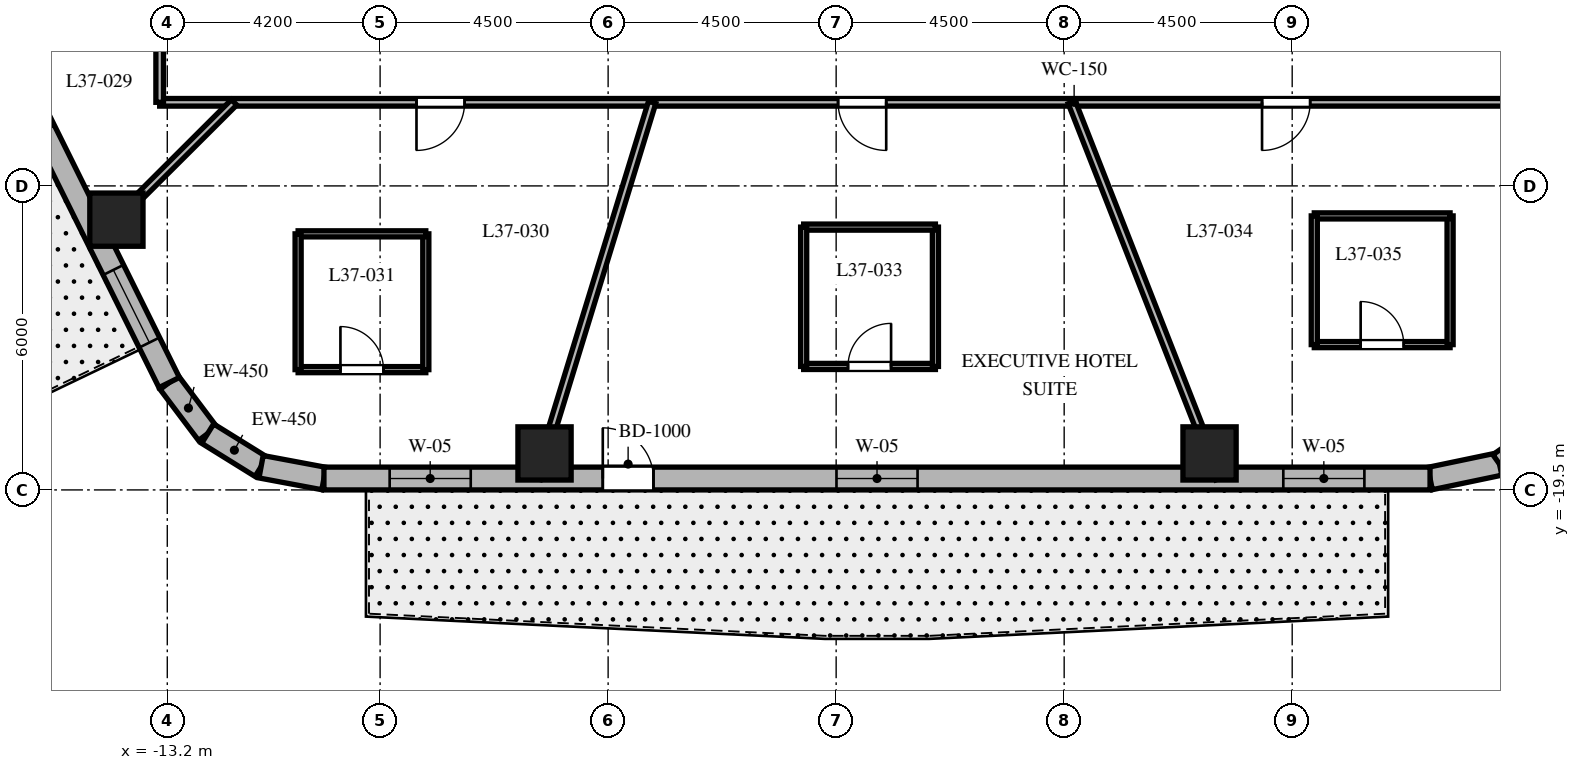
"""IFC4 building model, lengths in metres.
Left out: names, types, materials, properties, quantities, classifications, styles, units other than length and angle.
Written with IfcOpenShell. Run it as: python <this file> out.ifc"""

import sys

from ifc_helpers import new_model, si_unit, direction, frame, frame_2d, origin, origin_2d, place, context, subcontext, project, spatial, rectangle, extrude, element, fill, save


model = new_model("IFC4")
c1 = context("Model", 3, precision=1e-05, world=origin(), true_north=direction((0.0, 1.0)))
c2 = subcontext(c1, "Body", "Model", "MODEL_VIEW")
j1 = project(units=[si_unit("LENGTHUNIT", "METRE"), si_unit("PLANEANGLEUNIT", "RADIAN")], contexts=[c1])
p1 = place(None, origin())
s1 = spatial("IfcSite", under=j1, at=p1, CompositionType="ELEMENT")
p2 = place(p1, origin())
s2 = spatial("IfcBuilding", under=s1, at=p2, CompositionType="ELEMENT")
p3 = place(p2, frame((0.0, 0.0, 151.7)))
s3 = spatial("IfcBuildingStorey", under=s2, at=p3, CompositionType="ELEMENT", Elevation=151.7)
for number, where, z_axis, x_axis in (
    (1, (-5.755, -18.78, 0.0), (0.0, 0.0, 1.0), (1.0, 0.0, 0.0)),
    (2, (7.369, -18.78, 0.0), (0.0, 0.0, 1.0), (1.0, 0.0, 0.0)),
    (3, (-14.204, -14.166, 0.0), (0.0, 0.0, 1.0), (1.0, 0.0, 0.0)),
):
    element("IfcColumn", number, at=place(p3, frame(where, z_axis=z_axis, x_axis=x_axis)), inside=s3, PredefinedType="COLUMN", context=c2, shape_type="SweptSolid", body=[
        extrude(rectangle(XDim=1.05, YDim=1.05, at=origin_2d()), origin(), (0.0, 0.0, 1.0), 3.7),
    ])
p4 = place(p3, frame((-13.162, -17.381, 0.0), z_axis=(0.0, 0.0, 1.0), x_axis=(0.601515770517, -0.798860925205, 0.0)))
e4 = element("IfcWall", 4, at=p4, inside=s3, PredefinedType="SOLIDWALL", context=c2, shape_type="SweptSolid", body=[
    extrude(rectangle(XDim=1.262, YDim=0.45, at=frame_2d((0.631, 0.0))), origin(), (0.0, 0.0, 1.0), 3.4),
])
p5 = place(p3, frame((-12.403, -18.389, 0.0), z_axis=(0.0, 0.0, 1.0), x_axis=(0.849795170926, -0.527113049991, 0.0)))
e5 = element("IfcWall", 5, at=p5, inside=s3, PredefinedType="SOLIDWALL", context=c2, shape_type="SweptSolid", body=[
    extrude(rectangle(XDim=1.241, YDim=0.45, at=frame_2d((0.62, 0.0))), origin(), (0.0, 0.0, 1.0), 3.4),
])
p6 = place(p3, frame((-11.349, -19.043, 0.0), z_axis=(0.0, 0.0, 1.0), x_axis=(0.982931267051, -0.183973161772, 0.0)))
e6 = element("IfcWall", 6, at=p6, inside=s3, PredefinedType="SOLIDWALL", context=c2, shape_type="SweptSolid", body=[
    extrude(rectangle(XDim=1.262, YDim=0.45, at=frame_2d((0.631, 0.0))), origin(), (0.0, 0.0, 1.0), 3.4),
])
p7 = place(p3, frame((11.72, -19.275, 0.0), z_axis=(0.0, 0.0, 1.0), x_axis=(0.97893106758, 0.204191001093, 0.0)))
e7 = element("IfcWall", 7, at=p7, inside=s3, PredefinedType="SOLIDWALL", context=c2, shape_type="SweptSolid", body=[
    extrude(rectangle(XDim=1.4, YDim=0.45, at=frame_2d((0.7, 0.0))), origin(), (0.0, 0.0, 1.0), 3.4),
])
p8 = place(p3, frame((13.091, -18.989, 0.0), z_axis=(0.0, 0.0, 1.0), x_axis=(0.815574637848, 0.578651890258, 0.0)))
e8 = element("IfcWall", 8, at=p8, inside=s3, PredefinedType="SOLIDWALL", context=c2, shape_type="SweptSolid", body=[
    extrude(rectangle(XDim=1.377, YDim=0.45, at=frame_2d((0.688, 0.0))), origin(), (0.0, 0.0, 1.0), 3.4),
])
p9 = place(p3, frame((-10.108, -19.275, 0.0), z_axis=(0.0, 0.0, 1.0), x_axis=(1.0, 0.0, 0.0)))
e9 = element("IfcWall", 9, at=p9, inside=s3, PredefinedType="SOLIDWALL", context=c2, shape_type="SweptSolid", body=[
    extrude(rectangle(XDim=21.829, YDim=0.45, at=frame_2d((10.915, 0.0))), origin(), (0.0, 0.0, 1.0), 3.4),
])
p10 = place(p9, frame((5.503, 0.0, 0.0)))
e10 = element("IfcOpeningElement", 10, at=p10, cuts=e9, PredefinedType="OPENING", context=c2, shape_type="SweptSolid", body=[
    extrude(rectangle(XDim=1.0, YDim=2.15, at=frame_2d((0.5, 1.075))), frame((0.0, 0.235, 0.0), z_axis=(0.0, -1.0, 0.0), x_axis=(1.0, 0.0, 0.0)), (0.0, 0.0, 1.0), 0.47),
])
p11 = place(p9, frame((1.297, 0.0, 0.8)))
e11 = element("IfcOpeningElement", 11, at=p11, cuts=e9, PredefinedType="OPENING", context=c2, shape_type="SweptSolid", body=[
    extrude(rectangle(XDim=1.6, YDim=1.75, at=frame_2d((0.8, 0.875))), frame((0.0, 0.235, 0.0), z_axis=(0.0, -1.0, 0.0), x_axis=(1.0, 0.0, 0.0)), (0.0, 0.0, 1.0), 0.47),
])
p12 = place(p9, frame((10.115, 0.0, 0.8)))
e12 = element("IfcOpeningElement", 12, at=p12, cuts=e9, PredefinedType="OPENING", context=c2, shape_type="SweptSolid", body=[
    extrude(rectangle(XDim=1.6, YDim=1.75, at=frame_2d((0.8, 0.875))), frame((0.0, 0.235, 0.0), z_axis=(0.0, -1.0, 0.0), x_axis=(1.0, 0.0, 0.0)), (0.0, 0.0, 1.0), 0.47),
])
p13 = place(p9, frame((18.933, 0.0, 0.8)))
e13 = element("IfcOpeningElement", 13, at=p13, cuts=e9, PredefinedType="OPENING", context=c2, shape_type="SweptSolid", body=[
    extrude(rectangle(XDim=1.6, YDim=1.75, at=frame_2d((0.8, 0.875))), frame((0.0, 0.235, 0.0), z_axis=(0.0, -1.0, 0.0), x_axis=(1.0, 0.0, 0.0)), (0.0, 0.0, 1.0), 0.47),
])
p14 = place(p3, frame((-20.618, -2.344, 0.0), z_axis=(0.0, 0.0, 1.0), x_axis=(0.444243691097, -0.895905990002, 0.0)))
e14 = element("IfcWall", 14, at=p14, inside=s3, PredefinedType="SOLIDWALL", context=c2, shape_type="SweptSolid", body=[
    extrude(rectangle(XDim=16.784, YDim=0.45, at=frame_2d((8.392, 0.0))), origin(), (0.0, 0.0, 1.0), 3.4),
])
p15 = place(p14, frame((4.535, 0.0, 0.0)))
e15 = element("IfcOpeningElement", 15, at=p15, cuts=e14, PredefinedType="OPENING", context=c2, shape_type="SweptSolid", body=[
    extrude(rectangle(XDim=0.95, YDim=2.15, at=frame_2d((0.475, 1.075))), frame((0.0, 0.235, 0.0), z_axis=(0.0, -1.0, 0.0), x_axis=(1.0, 0.0, 0.0)), (0.0, 0.0, 1.0), 0.47),
])
p16 = place(p14, frame((0.931, 0.0, 0.8)))
e16 = element("IfcOpeningElement", 16, at=p16, cuts=e14, PredefinedType="OPENING", context=c2, shape_type="SweptSolid", body=[
    extrude(rectangle(XDim=1.6, YDim=1.75, at=frame_2d((0.8, 0.875))), frame((0.0, 0.235, 0.0), z_axis=(0.0, -1.0, 0.0), x_axis=(1.0, 0.0, 0.0)), (0.0, 0.0, 1.0), 0.47),
])
p17 = place(p14, frame((5.942, 0.0, 0.8)))
e17 = element("IfcOpeningElement", 17, at=p17, cuts=e14, PredefinedType="OPENING", context=c2, shape_type="SweptSolid", body=[
    extrude(rectangle(XDim=1.0, YDim=1.65, at=frame_2d((0.5, 0.825))), frame((0.0, 0.235, 0.0), z_axis=(0.0, -1.0, 0.0), x_axis=(1.0, 0.0, 0.0)), (0.0, 0.0, 1.0), 0.47),
])
p18 = place(p14, frame((9.633, 0.0, 0.8)))
e18 = element("IfcOpeningElement", 18, at=p18, cuts=e14, PredefinedType="OPENING", context=c2, shape_type="SweptSolid", body=[
    extrude(rectangle(XDim=1.6, YDim=1.75, at=frame_2d((0.8, 0.875))), frame((0.0, 0.235, 0.0), z_axis=(0.0, -1.0, 0.0), x_axis=(1.0, 0.0, 0.0)), (0.0, 0.0, 1.0), 0.47),
])
p19 = place(p14, frame((14.303, 0.0, 0.8)))
e19 = element("IfcOpeningElement", 19, at=p19, cuts=e14, PredefinedType="OPENING", context=c2, shape_type="SweptSolid", body=[
    extrude(rectangle(XDim=1.6, YDim=1.75, at=frame_2d((0.8, 0.875))), frame((0.0, 0.235, 0.0), z_axis=(0.0, -1.0, 0.0), x_axis=(1.0, 0.0, 0.0)), (0.0, 0.0, 1.0), 0.47),
])
p20 = place(p3, frame((13.35, -11.85, 0.0), z_axis=(0.0, 0.0, 1.0), x_axis=(-1.0, 0.0, 0.0)))
e20 = element("IfcWall", 20, at=p20, inside=s3, PredefinedType="PARTITIONING", context=c2, shape_type="SweptSolid", body=[
    extrude(rectangle(XDim=26.7, YDim=0.15, at=frame_2d((13.35, 0.0))), origin(), (0.0, 0.0, 1.0), 2.84),
])
p21 = place(p20, frame((20.682, 0.0, 0.0)))
e21 = element("IfcOpeningElement", 21, at=p21, cuts=e20, PredefinedType="OPENING", context=c2, shape_type="SweptSolid", body=[
    extrude(rectangle(XDim=0.95, YDim=2.03, at=frame_2d((0.475, 1.015))), frame((0.0, 0.085, 0.0), z_axis=(0.0, -1.0, 0.0), x_axis=(1.0, 0.0, 0.0)), (0.0, 0.0, 1.0), 0.17),
])
p22 = place(p20, frame((12.362, 0.0, 0.0)))
e22 = element("IfcOpeningElement", 22, at=p22, cuts=e20, PredefinedType="OPENING", context=c2, shape_type="SweptSolid", body=[
    extrude(rectangle(XDim=0.95, YDim=2.03, at=frame_2d((0.475, 1.015))), frame((0.0, 0.085, 0.0), z_axis=(0.0, -1.0, 0.0), x_axis=(1.0, 0.0, 0.0)), (0.0, 0.0, 1.0), 0.17),
])
p23 = place(p20, frame((3.995, 0.0, 0.0)))
e23 = element("IfcOpeningElement", 23, at=p23, cuts=e20, PredefinedType="OPENING", context=c2, shape_type="SweptSolid", body=[
    extrude(rectangle(XDim=0.95, YDim=2.03, at=frame_2d((0.475, 1.015))), frame((0.0, 0.085, 0.0), z_axis=(0.0, -1.0, 0.0), x_axis=(1.0, 0.0, 0.0)), (0.0, 0.0, 1.0), 0.17),
])
p24 = place(p3, frame((-13.35, -11.85, 0.0), z_axis=(0.0, 0.0, 1.0), x_axis=(0.0, 1.0, 0.0)))
e24 = element("IfcWall", 24, at=p24, inside=s3, PredefinedType="PARTITIONING", context=c2, shape_type="SweptSolid", body=[
    extrude(rectangle(XDim=23.7, YDim=0.15, at=frame_2d((11.85, 0.0))), origin(), (0.0, 0.0, 1.0), 2.84),
])
p25 = place(p24, frame((18.389, 0.0, 0.0)))
e25 = element("IfcOpeningElement", 25, at=p25, cuts=e24, PredefinedType="OPENING", context=c2, shape_type="SweptSolid", body=[
    extrude(rectangle(XDim=0.95, YDim=2.03, at=frame_2d((0.475, 1.015))), frame((0.0, 0.085, 0.0), z_axis=(0.0, -1.0, 0.0), x_axis=(1.0, 0.0, 0.0)), (0.0, 0.0, 1.0), 0.17),
])
p26 = place(p24, frame((10.751, 0.0, 0.0)))
e26 = element("IfcOpeningElement", 26, at=p26, cuts=e24, PredefinedType="OPENING", context=c2, shape_type="SweptSolid", body=[
    extrude(rectangle(XDim=0.95, YDim=2.03, at=frame_2d((0.475, 1.015))), frame((0.0, 0.085, 0.0), z_axis=(0.0, -1.0, 0.0), x_axis=(1.0, 0.0, 0.0)), (0.0, 0.0, 1.0), 0.17),
])
p27 = place(p24, frame((5.951, 0.0, 0.0)))
e27 = element("IfcOpeningElement", 27, at=p27, cuts=e24, PredefinedType="OPENING", context=c2, shape_type="SweptSolid", body=[
    extrude(rectangle(XDim=0.9, YDim=2.03, at=frame_2d((0.45, 1.015))), frame((0.0, 0.085, 0.0), z_axis=(0.0, -1.0, 0.0), x_axis=(1.0, 0.0, 0.0)), (0.0, 0.0, 1.0), 0.17),
])
p28 = place(p24, frame((1.993, 0.0, 0.0)))
e28 = element("IfcOpeningElement", 28, at=p28, cuts=e24, PredefinedType="OPENING", context=c2, shape_type="SweptSolid", body=[
    extrude(rectangle(XDim=0.9, YDim=2.03, at=frame_2d((0.45, 1.015))), frame((0.0, 0.085, 0.0), z_axis=(0.0, -1.0, 0.0), x_axis=(1.0, 0.0, 0.0)), (0.0, 0.0, 1.0), 0.17),
])
p29 = place(p3, frame((-11.882, -11.85, 0.0), z_axis=(0.0, 0.0, 1.0), x_axis=(-0.708037373639, -0.706174962407, 0.0)))
e29 = element("IfcWall", 29, at=p29, inside=s3, PredefinedType="PARTITIONING", context=c2, shape_type="SweptSolid", body=[
    extrude(rectangle(XDim=3.802, YDim=0.15, at=frame_2d((1.901, 0.0))), origin(), (0.0, 0.0, 1.0), 2.64),
])
p30 = place(p3, frame((-3.631, -11.85, 0.0), z_axis=(0.0, 0.0, 1.0), x_axis=(-0.293007573338, -0.956110120209, 0.0)))
e30 = element("IfcWall", 30, at=p30, inside=s3, PredefinedType="PARTITIONING", context=c2, shape_type="SweptSolid", body=[
    extrude(rectangle(XDim=7.766, YDim=0.15, at=frame_2d((3.883, 0.0))), origin(), (0.0, 0.0, 1.0), 2.64),
])
p31 = place(p3, frame((4.65, -11.85, 0.0), z_axis=(0.0, 0.0, 1.0), x_axis=(0.365265947993, -0.930903210456, 0.0)))
e31 = element("IfcWall", 31, at=p31, inside=s3, PredefinedType="PARTITIONING", context=c2, shape_type="SweptSolid", body=[
    extrude(rectangle(XDim=7.976, YDim=0.15, at=frame_2d((3.988, 0.0))), origin(), (0.0, 0.0, 1.0), 2.64),
])
p32 = place(p3, frame((-10.618, -17.126, 0.0), z_axis=(0.0, 0.0, 1.0), x_axis=(1.0, 0.0, 0.0)))
e32 = element("IfcWall", 32, at=p32, inside=s3, PredefinedType="PARTITIONING", context=c2, shape_type="SweptSolid", body=[
    extrude(rectangle(XDim=2.52, YDim=0.12, at=frame_2d((1.26, 0.0))), origin(), (0.0, 0.0, 1.0), 2.64),
])
p33 = place(p32, frame((0.835, 0.0, 0.0)))
e33 = element("IfcOpeningElement", 33, at=p33, cuts=e32, PredefinedType="OPENING", context=c2, shape_type="SweptSolid", body=[
    extrude(rectangle(XDim=0.85, YDim=2.03, at=frame_2d((0.425, 1.015))), frame((0.0, 0.07, 0.0), z_axis=(0.0, -1.0, 0.0), x_axis=(1.0, 0.0, 0.0)), (0.0, 0.0, 1.0), 0.14),
])
p34 = place(p3, frame((-8.098, -17.126, 0.0), z_axis=(0.0, 0.0, 1.0), x_axis=(0.0, 1.0, 0.0)))
e34 = element("IfcWall", 34, at=p34, inside=s3, PredefinedType="PARTITIONING", context=c2, shape_type="SweptSolid", body=[
    extrude(rectangle(XDim=2.68, YDim=0.12, at=frame_2d((1.34, 0.0))), origin(), (0.0, 0.0, 1.0), 3.4),
])
p35 = place(p3, frame((-8.098, -14.446, 0.0), z_axis=(0.0, 0.0, 1.0), x_axis=(-1.0, 0.0, 0.0)))
e35 = element("IfcWall", 35, at=p35, inside=s3, PredefinedType="PARTITIONING", context=c2, shape_type="SweptSolid", body=[
    extrude(rectangle(XDim=2.52, YDim=0.12, at=frame_2d((1.26, 0.0))), origin(), (0.0, 0.0, 1.0), 3.4),
])
p36 = place(p3, frame((-10.618, -14.446, 0.0), z_axis=(0.0, 0.0, 1.0), x_axis=(0.0, -1.0, 0.0)))
e36 = element("IfcWall", 36, at=p36, inside=s3, PredefinedType="PARTITIONING", context=c2, shape_type="SweptSolid", body=[
    extrude(rectangle(XDim=2.68, YDim=0.12, at=frame_2d((1.34, 0.0))), origin(), (0.0, 0.0, 1.0), 2.64),
])
p37 = place(p3, frame((-0.641, -17.063, 0.0), z_axis=(0.0, 0.0, 1.0), x_axis=(1.0, 0.0, 0.0)))
e37 = element("IfcWall", 37, at=p37, inside=s3, PredefinedType="PARTITIONING", context=c2, shape_type="SweptSolid", body=[
    extrude(rectangle(XDim=2.6, YDim=0.12, at=frame_2d((1.3, 0.0))), origin(), (0.0, 0.0, 1.0), 3.4),
])
p38 = place(p37, frame((0.875, 0.0, 0.0)))
e38 = element("IfcOpeningElement", 38, at=p38, cuts=e37, PredefinedType="OPENING", context=c2, shape_type="SweptSolid", body=[
    extrude(rectangle(XDim=0.85, YDim=2.03, at=frame_2d((0.425, 1.015))), frame((0.0, 0.07, 0.0), z_axis=(0.0, -1.0, 0.0), x_axis=(1.0, 0.0, 0.0)), (0.0, 0.0, 1.0), 0.14),
])
p39 = place(p3, frame((1.959, -17.063, 0.0), z_axis=(0.0, 0.0, 1.0), x_axis=(0.0, 1.0, 0.0)))
e39 = element("IfcWall", 39, at=p39, inside=s3, PredefinedType="PARTITIONING", context=c2, shape_type="SweptSolid", body=[
    extrude(rectangle(XDim=2.75, YDim=0.12, at=frame_2d((1.375, 0.0))), origin(), (0.0, 0.0, 1.0), 2.84),
])
p40 = place(p3, frame((1.959, -14.313, 0.0), z_axis=(0.0, 0.0, 1.0), x_axis=(-1.0, 0.0, 0.0)))
e40 = element("IfcWall", 40, at=p40, inside=s3, PredefinedType="PARTITIONING", context=c2, shape_type="SweptSolid", body=[
    extrude(rectangle(XDim=2.6, YDim=0.12, at=frame_2d((1.3, 0.0))), origin(), (0.0, 0.0, 1.0), 3.4),
])
p41 = place(p3, frame((-0.641, -14.313, 0.0), z_axis=(0.0, 0.0, 1.0), x_axis=(0.0, -1.0, 0.0)))
e41 = element("IfcWall", 41, at=p41, inside=s3, PredefinedType="PARTITIONING", context=c2, shape_type="SweptSolid", body=[
    extrude(rectangle(XDim=2.75, YDim=0.12, at=frame_2d((1.375, 0.0))), origin(), (0.0, 0.0, 1.0), 2.84),
])
p42 = place(p3, frame((9.436, -16.632, 0.0), z_axis=(0.0, 0.0, 1.0), x_axis=(1.0, 0.0, 0.0)))
e42 = element("IfcWall", 42, at=p42, inside=s3, PredefinedType="PARTITIONING", context=c2, shape_type="SweptSolid", body=[
    extrude(rectangle(XDim=2.68, YDim=0.12, at=frame_2d((1.34, 0.0))), origin(), (0.0, 0.0, 1.0), 2.64),
])
p43 = place(p42, frame((0.915, 0.0, 0.0)))
e43 = element("IfcOpeningElement", 43, at=p43, cuts=e42, PredefinedType="OPENING", context=c2, shape_type="SweptSolid", body=[
    extrude(rectangle(XDim=0.85, YDim=2.03, at=frame_2d((0.425, 1.015))), frame((0.0, 0.07, 0.0), z_axis=(0.0, -1.0, 0.0), x_axis=(1.0, 0.0, 0.0)), (0.0, 0.0, 1.0), 0.14),
])
p44 = place(p3, frame((12.116, -16.632, 0.0), z_axis=(0.0, 0.0, 1.0), x_axis=(0.0, 1.0, 0.0)))
e44 = element("IfcWall", 44, at=p44, inside=s3, PredefinedType="PARTITIONING", context=c2, shape_type="SweptSolid", body=[
    extrude(rectangle(XDim=2.54, YDim=0.12, at=frame_2d((1.27, 0.0))), origin(), (0.0, 0.0, 1.0), 2.64),
])
p45 = place(p3, frame((12.116, -14.092, 0.0), z_axis=(0.0, 0.0, 1.0), x_axis=(-1.0, 0.0, 0.0)))
e45 = element("IfcWall", 45, at=p45, inside=s3, PredefinedType="PARTITIONING", context=c2, shape_type="SweptSolid", body=[
    extrude(rectangle(XDim=2.68, YDim=0.12, at=frame_2d((1.34, 0.0))), origin(), (0.0, 0.0, 1.0), 2.927),
])
p46 = place(p3, frame((9.436, -14.092, 0.0), z_axis=(0.0, 0.0, 1.0), x_axis=(0.0, -1.0, 0.0)))
e46 = element("IfcWall", 46, at=p46, inside=s3, PredefinedType="PARTITIONING", context=c2, shape_type="SweptSolid", body=[
    extrude(rectangle(XDim=2.54, YDim=0.12, at=frame_2d((1.27, 0.0))), origin(), (0.0, 0.0, 1.0), 2.927),
])
p47 = place(p10, origin())
e47 = element("IfcDoor", 47, at=p47, inside=s3, OperationType="SINGLE_SWING_LEFT", PredefinedType="DOOR", context=c2, shape_type="SweptSolid", body=[
    extrude(rectangle(XDim=1.0, YDim=2.15, at=frame_2d((0.5, 1.075))), frame((0.0, 0.025, 0.0), z_axis=(0.0, -1.0, 0.0), x_axis=(1.0, 0.0, 0.0)), (0.0, 0.0, 1.0), 0.05),
])
fill(e10, e47)
p48 = place(p11, origin())
e48 = element("IfcWindow", 48, at=p48, inside=s3, PartitioningType="SINGLE_PANEL", PredefinedType="WINDOW", context=c2, shape_type="SweptSolid", body=[
    extrude(rectangle(XDim=1.6, YDim=1.75, at=frame_2d((0.8, 0.875))), frame((0.0, 0.03, 0.0), z_axis=(0.0, -1.0, 0.0), x_axis=(1.0, 0.0, 0.0)), (0.0, 0.0, 1.0), 0.06),
])
fill(e11, e48)
p49 = place(p12, origin())
e49 = element("IfcWindow", 49, at=p49, inside=s3, PartitioningType="SINGLE_PANEL", PredefinedType="WINDOW", context=c2, shape_type="SweptSolid", body=[
    extrude(rectangle(XDim=1.6, YDim=1.75, at=frame_2d((0.8, 0.875))), frame((0.0, 0.03, 0.0), z_axis=(0.0, -1.0, 0.0), x_axis=(1.0, 0.0, 0.0)), (0.0, 0.0, 1.0), 0.06),
])
fill(e12, e49)
p50 = place(p13, origin())
e50 = element("IfcWindow", 50, at=p50, inside=s3, PartitioningType="SINGLE_PANEL", PredefinedType="WINDOW", context=c2, shape_type="SweptSolid", body=[
    extrude(rectangle(XDim=1.6, YDim=1.75, at=frame_2d((0.8, 0.875))), frame((0.0, 0.03, 0.0), z_axis=(0.0, -1.0, 0.0), x_axis=(1.0, 0.0, 0.0)), (0.0, 0.0, 1.0), 0.06),
])
fill(e13, e50)
p51 = place(p19, origin())
e51 = element("IfcWindow", 51, at=p51, inside=s3, PartitioningType="SINGLE_PANEL", PredefinedType="WINDOW", context=c2, shape_type="SweptSolid", body=[
    extrude(rectangle(XDim=1.6, YDim=1.75, at=frame_2d((0.8, 0.875))), frame((0.0, 0.03, 0.0), z_axis=(0.0, -1.0, 0.0), x_axis=(1.0, 0.0, 0.0)), (0.0, 0.0, 1.0), 0.06),
])
fill(e19, e51)
p52 = place(p21, origin())
e52 = element("IfcDoor", 52, at=p52, inside=s3, OperationType="SINGLE_SWING_RIGHT", PredefinedType="DOOR", context=c2, shape_type="SweptSolid", body=[
    extrude(rectangle(XDim=0.95, YDim=2.03, at=frame_2d((0.475, 1.015))), frame((0.0, 0.025, 0.0), z_axis=(0.0, -1.0, 0.0), x_axis=(1.0, 0.0, 0.0)), (0.0, 0.0, 1.0), 0.05),
])
fill(e21, e52)
p53 = place(p33, origin())
e53 = element("IfcDoor", 53, at=p53, inside=s3, OperationType="SINGLE_SWING_LEFT", PredefinedType="DOOR", context=c2, shape_type="SweptSolid", body=[
    extrude(rectangle(XDim=0.85, YDim=2.03, at=frame_2d((0.425, 1.015))), frame((0.0, 0.025, 0.0), z_axis=(0.0, -1.0, 0.0), x_axis=(1.0, 0.0, 0.0)), (0.0, 0.0, 1.0), 0.05),
])
fill(e33, e53)
p54 = place(p22, origin())
e54 = element("IfcDoor", 54, at=p54, inside=s3, OperationType="SINGLE_SWING_LEFT", PredefinedType="DOOR", context=c2, shape_type="SweptSolid", body=[
    extrude(rectangle(XDim=0.95, YDim=2.03, at=frame_2d((0.475, 1.015))), frame((0.0, 0.025, 0.0), z_axis=(0.0, -1.0, 0.0), x_axis=(1.0, 0.0, 0.0)), (0.0, 0.0, 1.0), 0.05),
])
fill(e22, e54)
p55 = place(p38, origin())
e55 = element("IfcDoor", 55, at=p55, inside=s3, OperationType="SINGLE_SWING_RIGHT", PredefinedType="DOOR", context=c2, shape_type="SweptSolid", body=[
    extrude(rectangle(XDim=0.85, YDim=2.03, at=frame_2d((0.425, 1.015))), frame((0.0, 0.025, 0.0), z_axis=(0.0, -1.0, 0.0), x_axis=(1.0, 0.0, 0.0)), (0.0, 0.0, 1.0), 0.05),
])
fill(e38, e55)
p56 = place(p23, origin())
e56 = element("IfcDoor", 56, at=p56, inside=s3, OperationType="SINGLE_SWING_RIGHT", PredefinedType="DOOR", context=c2, shape_type="SweptSolid", body=[
    extrude(rectangle(XDim=0.95, YDim=2.03, at=frame_2d((0.475, 1.015))), frame((0.0, 0.025, 0.0), z_axis=(0.0, -1.0, 0.0), x_axis=(1.0, 0.0, 0.0)), (0.0, 0.0, 1.0), 0.05),
])
fill(e23, e56)
p57 = place(p43, origin())
e57 = element("IfcDoor", 57, at=p57, inside=s3, OperationType="SINGLE_SWING_LEFT", PredefinedType="DOOR", context=c2, shape_type="SweptSolid", body=[
    extrude(rectangle(XDim=0.85, YDim=2.03, at=frame_2d((0.425, 1.015))), frame((0.0, 0.025, 0.0), z_axis=(0.0, -1.0, 0.0), x_axis=(1.0, 0.0, 0.0)), (0.0, 0.0, 1.0), 0.05),
])
fill(e43, e57)
save(model, sys.argv[1])
